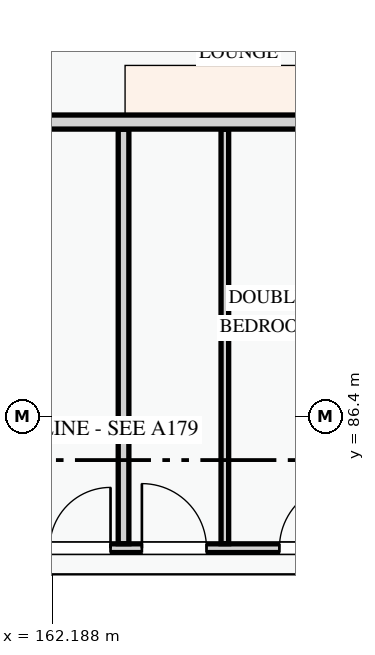
"""IFC4 building model, lengths in metres.
Left out: names, types, materials, properties, quantities, classifications, styles, units other than length and angle.
Written with IfcOpenShell. Run it as: python <this file> out.ifc"""

import sys

from ifc_helpers import new_model, si_unit, direction, frame, frame_2d, origin, place, context, subcontext, project, spatial, rectangle, extrude, element, fill, save


model = new_model("IFC4")
c1 = context("Model", 3, precision=1e-05, world=origin(), true_north=direction((0.0, 1.0)))
c2 = subcontext(c1, "Body", "Model", "MODEL_VIEW")
j1 = project(units=[si_unit("LENGTHUNIT", "METRE"), si_unit("PLANEANGLEUNIT", "RADIAN")], contexts=[c1])
p1 = place(None, origin())
s1 = spatial("IfcSite", under=j1, at=p1, CompositionType="ELEMENT")
p2 = place(p1, origin())
s2 = spatial("IfcBuilding", under=s1, at=p2, CompositionType="ELEMENT")
p3 = place(p2, frame((0.0, 0.0, 31.2)))
s3 = spatial("IfcBuildingStorey", under=s2, at=p3, CompositionType="ELEMENT", Elevation=31.2)
p4 = place(p3, frame((161.98, 84.674, 0.0), z_axis=(0.0, 0.0, 1.0), x_axis=(1.0, 0.0, 0.0)))
e1 = element("IfcWall", 1, at=p4, inside=s3, PredefinedType="PARTITIONING", context=c2, shape_type="SweptSolid", body=[
    extrude(rectangle(XDim=4.686, YDim=0.115, at=frame_2d((2.343, 0.0))), origin(), (0.0, 0.0, 1.0), 3.0),
])
p5 = place(p4, frame((0.171, 0.0, 0.0)))
e2 = element("IfcOpeningElement", 2, at=p5, cuts=e1, PredefinedType="OPENING", context=c2, shape_type="SweptSolid", body=[
    extrude(rectangle(XDim=0.8, YDim=2.1, at=frame_2d((0.4, 1.05))), frame((0.0, 0.067, 0.0), z_axis=(0.0, -1.0, 0.0), x_axis=(1.0, 0.0, 0.0)), (0.0, 0.0, 1.0), 0.135),
])
p6 = place(p4, frame((1.384, 0.0, 0.0)))
e3 = element("IfcOpeningElement", 3, at=p6, cuts=e1, PredefinedType="OPENING", context=c2, shape_type="SweptSolid", body=[
    extrude(rectangle(XDim=0.85, YDim=2.1, at=frame_2d((0.425, 1.05))), frame((0.0, 0.067, 0.0), z_axis=(0.0, -1.0, 0.0), x_axis=(1.0, 0.0, 0.0)), (0.0, 0.0, 1.0), 0.135),
])
p7 = place(p4, frame((3.193, 0.0, 0.0)))
e4 = element("IfcOpeningElement", 4, at=p7, cuts=e1, PredefinedType="OPENING", context=c2, shape_type="SweptSolid", body=[
    extrude(rectangle(XDim=0.85, YDim=2.1, at=frame_2d((0.425, 1.05))), frame((0.0, 0.067, 0.0), z_axis=(0.0, -1.0, 0.0), x_axis=(1.0, 0.0, 0.0)), (0.0, 0.0, 1.0), 0.135),
])
p8 = place(p3, frame((164.455, 84.733, 0.0), z_axis=(0.0, 0.0, 1.0), x_axis=(0.0, 1.0, 0.0)))
e5 = element("IfcWall", 5, at=p8, inside=s3, PredefinedType="PARTITIONING", context=c2, shape_type="SweptSolid", body=[
    extrude(rectangle(XDim=5.452, YDim=0.1, at=frame_2d((2.726, 0.0))), origin(), (0.0, 0.0, 1.0), 3.0),
])
p9 = place(p3, frame((163.122, 84.733, 0.0), z_axis=(0.0, 0.0, 1.0), x_axis=(0.0, 1.0, 0.0)))
e6 = element("IfcWall", 6, at=p9, inside=s3, PredefinedType="PARTITIONING", context=c2, shape_type="SweptSolid", body=[
    extrude(rectangle(XDim=5.452, YDim=0.14, at=frame_2d((2.726, 0.0))), origin(), (0.0, 0.0, 1.0), 3.0),
])
p10 = place(p3, frame((162.064, 90.28, 0.0), z_axis=(0.0, 0.0, 1.0), x_axis=(1.0, 0.0, 0.0)))
e7 = element("IfcWall", 7, at=p10, inside=s3, PredefinedType="PARTITIONING", context=c2, shape_type="SweptSolid", body=[
    extrude(rectangle(XDim=4.601, YDim=0.185, at=frame_2d((2.301, 0.0))), origin(), (0.0, 0.0, 1.0), 3.0),
])
p11 = place(p5, origin())
e8 = element("IfcDoor", 8, at=p11, inside=s3, OperationType="SINGLE_SWING_RIGHT", PredefinedType="DOOR", context=c2, shape_type="SweptSolid", body=[
    extrude(rectangle(XDim=0.8, YDim=2.1, at=frame_2d((0.4, 1.05))), frame((0.0, 0.025, 0.0), z_axis=(0.0, -1.0, 0.0), x_axis=(1.0, 0.0, 0.0)), (0.0, 0.0, 1.0), 0.05),
])
fill(e2, e8)
p12 = place(p6, origin())
e9 = element("IfcDoor", 9, at=p12, inside=s3, OperationType="SINGLE_SWING_LEFT", PredefinedType="DOOR", context=c2, shape_type="SweptSolid", body=[
    extrude(rectangle(XDim=0.85, YDim=2.1, at=frame_2d((0.425, 1.05))), frame((0.0, 0.025, 0.0), z_axis=(0.0, -1.0, 0.0), x_axis=(1.0, 0.0, 0.0)), (0.0, 0.0, 1.0), 0.05),
])
fill(e3, e9)
p13 = place(p7, origin())
e10 = element("IfcDoor", 10, at=p13, inside=s3, OperationType="SINGLE_SWING_RIGHT", PredefinedType="DOOR", context=c2, shape_type="SweptSolid", body=[
    extrude(rectangle(XDim=0.85, YDim=2.1, at=frame_2d((0.425, 1.05))), frame((0.0, 0.025, 0.0), z_axis=(0.0, -1.0, 0.0), x_axis=(1.0, 0.0, 0.0)), (0.0, 0.0, 1.0), 0.05),
])
fill(e4, e10)
save(model, sys.argv[1])
